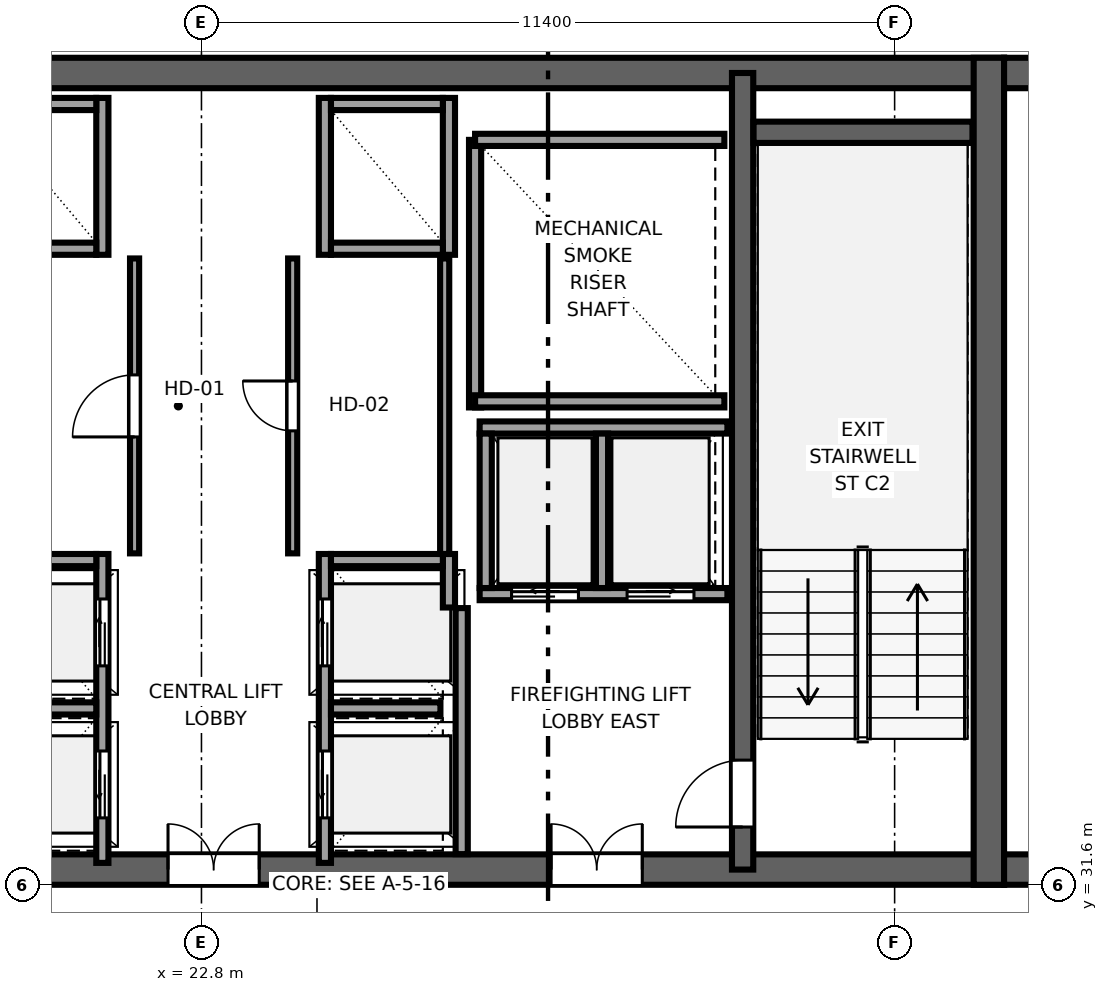
"""IFC4 building model, lengths in metres.
Left out: names, types, materials, properties, quantities, classifications, styles, units other than length and angle.
Written with IfcOpenShell. Run it as: python <this file> out.ifc"""

import sys

from ifc_helpers import new_model, si_unit, direction, frame, frame_2d, origin, place, context, subcontext, project, spatial, rectangle, extrude, source, transform, mapped, element, fill, save


model = new_model("IFC4")
c1 = context("Model", 3, precision=1e-05, world=origin(), true_north=direction((0.0, 1.0)))
c2 = subcontext(c1, "Body", "Model", "MODEL_VIEW")
j1 = project(units=[si_unit("LENGTHUNIT", "METRE"), si_unit("PLANEANGLEUNIT", "RADIAN")], contexts=[c1])
p1 = place(None, origin())
s1 = spatial("IfcSite", under=j1, at=p1, CompositionType="ELEMENT")
p2 = place(p1, origin())
s2 = spatial("IfcBuilding", under=s1, at=p2, CompositionType="ELEMENT")
p3 = place(p2, frame((0.0, 0.0, 238.1)))
s3 = spatial("IfcBuildingStorey", under=s2, at=p3, CompositionType="ELEMENT", Elevation=238.1)
p4 = place(p3, frame((10.0, 31.85, 0.0), z_axis=(0.0, 0.0, 1.0), x_axis=(1.0, 0.0, 0.0)))
e1 = element("IfcWall", 1, at=p4, inside=s3, PredefinedType="SHEAR", context=c2, shape_type="SweptSolid", body=[
    extrude(rectangle(XDim=26.0, YDim=0.5, at=frame_2d((13.0, 0.0))), origin(), (0.0, 0.0, 1.0), 3.55),
])
p5 = place(p4, frame((7.45, 0.0, 0.0), z_axis=(0.0, 0.0, 1.0), x_axis=(-1.0, 0.0, 0.0)))
e2 = element("IfcOpeningElement", 2, at=p5, cuts=e1, PredefinedType="OPENING", context=c2, shape_type="SweptSolid", body=[
    extrude(rectangle(XDim=1.5, YDim=2.04, at=frame_2d((0.75, 1.02))), frame((0.0, 0.26, 0.0), z_axis=(0.0, -1.0, 0.0), x_axis=(1.0, 0.0, 0.0)), (0.0, 0.0, 1.0), 0.52),
])
p6 = place(p4, frame((13.75, 0.0, 0.0), z_axis=(0.0, 0.0, 1.0), x_axis=(-1.0, 0.0, 0.0)))
e3 = element("IfcOpeningElement", 3, at=p6, cuts=e1, PredefinedType="OPENING", context=c2, shape_type="SweptSolid", body=[
    extrude(rectangle(XDim=1.5, YDim=2.04, at=frame_2d((0.75, 1.02))), frame((0.0, 0.26, 0.0), z_axis=(0.0, -1.0, 0.0), x_axis=(1.0, 0.0, 0.0)), (0.0, 0.0, 1.0), 0.52),
])
p7 = place(p4, frame((20.05, 0.0, 0.0), z_axis=(0.0, 0.0, 1.0), x_axis=(-1.0, 0.0, 0.0)))
e4 = element("IfcOpeningElement", 4, at=p7, cuts=e1, PredefinedType="OPENING", context=c2, shape_type="SweptSolid", body=[
    extrude(rectangle(XDim=1.5, YDim=2.04, at=frame_2d((0.75, 1.02))), frame((0.0, 0.26, 0.0), z_axis=(0.0, -1.0, 0.0), x_axis=(1.0, 0.0, 0.0)), (0.0, 0.0, 1.0), 0.52),
])
p8 = place(p3, frame((10.0, 44.95, 0.0), z_axis=(0.0, 0.0, 1.0), x_axis=(1.0, 0.0, 0.0)))
e5 = element("IfcWall", 5, at=p8, inside=s3, PredefinedType="SHEAR", context=c2, shape_type="SweptSolid", body=[
    extrude(rectangle(XDim=26.0, YDim=0.5, at=frame_2d((13.0, 0.0))), origin(), (0.0, 0.0, 1.0), 3.55),
])
p9 = place(p3, frame((35.75, 31.6, 0.0), z_axis=(0.0, 0.0, 1.0), x_axis=(0.0, 1.0, 0.0)))
e6 = element("IfcWall", 6, at=p9, inside=s3, PredefinedType="SHEAR", context=c2, shape_type="SweptSolid", body=[
    extrude(rectangle(XDim=13.6, YDim=0.5, at=frame_2d((6.8, 0.0))), origin(), (0.0, 0.0, 1.0), 3.55),
])
p10 = place(p3, frame((31.7, 31.85, 0.0), z_axis=(0.0, 0.0, 1.0), x_axis=(0.0, 1.0, 0.0)))
e7 = element("IfcWall", 7, at=p10, inside=s3, PredefinedType="SHEAR", context=c2, shape_type="SweptSolid", body=[
    extrude(rectangle(XDim=13.1, YDim=0.35, at=frame_2d((6.55, 0.0))), origin(), (0.0, 0.0, 1.0), 3.55),
])
p11 = place(p10, frame((1.8, 0.0, 0.0), z_axis=(0.0, 0.0, 1.0), x_axis=(-1.0, 0.0, 0.0)))
e8 = element("IfcOpeningElement", 8, at=p11, cuts=e7, PredefinedType="OPENING", context=c2, shape_type="SweptSolid", body=[
    extrude(rectangle(XDim=1.1, YDim=2.12, at=frame_2d((0.55, 1.06))), frame((0.0, 0.185, 0.0), z_axis=(0.0, -1.0, 0.0), x_axis=(1.0, 0.0, 0.0)), (0.0, 0.0, 1.0), 0.37),
])
p12 = place(p3, frame((36.0, 31.85, 0.0), z_axis=(0.0, 0.0, 1.0), x_axis=(1.0, 0.0, 0.0)))
e9 = element("IfcWall", 9, at=p12, inside=s3, PredefinedType="SHEAR", context=c2, shape_type="SweptSolid", body=[
    extrude(rectangle(XDim=3.8, YDim=0.5, at=frame_2d((1.9, 0.0))), origin(), (0.0, 0.0, 1.0), 3.55),
])
p13 = place(p12, frame((1.54, 0.0, 0.0), z_axis=(0.0, 0.0, 1.0), x_axis=(-1.0, 0.0, 0.0)))
e10 = element("IfcOpeningElement", 10, at=p13, cuts=e9, PredefinedType="OPENING", context=c2, shape_type="SweptSolid", body=[
    extrude(rectangle(XDim=1.02, YDim=2.03, at=frame_2d((0.51, 1.015))), frame((0.0, 0.26, 0.0), z_axis=(0.0, -1.0, 0.0), x_axis=(1.0, 0.0, 0.0)), (0.0, 0.0, 1.0), 0.52),
])
p14 = place(p3, frame((36.0, 44.95, 0.0), z_axis=(0.0, 0.0, 1.0), x_axis=(1.0, 0.0, 0.0)))
e11 = element("IfcWall", 11, at=p14, inside=s3, PredefinedType="SHEAR", context=c2, shape_type="SweptSolid", body=[
    extrude(rectangle(XDim=1.35, YDim=0.5, at=frame_2d((0.675, 0.0))), origin(), (0.0, 0.0, 1.0), 3.55),
])
p15 = place(p3, frame((31.88, 43.975, 0.0), z_axis=(0.0, 0.0, 1.0), x_axis=(1.0, 0.0, 0.0)))
e12 = element("IfcWall", 12, at=p15, inside=s3, PredefinedType="SHEAR", context=c2, shape_type="SweptSolid", body=[
    extrude(rectangle(XDim=3.6, YDim=0.35, at=frame_2d((1.8, 0.0))), origin(), (0.0, 0.0, 1.0), 3.55),
])
p16 = place(p3, frame((27.3, 39.45, 0.0), z_axis=(0.0, 0.0, 1.0), x_axis=(0.0, 1.0, 0.0)))
e13 = element("IfcWall", 13, at=p16, inside=s3, PredefinedType="SOLIDWALL", context=c2, shape_type="SweptSolid", body=[
    extrude(rectangle(XDim=4.4, YDim=0.2, at=frame_2d((2.2, 0.0))), origin(), (0.0, 0.0, 1.0), 3.29),
])
for number, where, z_axis, x_axis in (
    (14, (27.3, 39.55, 0.0), (0.0, 0.0, 1.0), (1.0, 0.0, 0.0)),
    (15, (27.3, 43.85, 0.0), (0.0, 0.0, 1.0), (1.0, 0.0, 0.0)),
):
    element("IfcWall", number, at=place(p3, frame(where, z_axis=z_axis, x_axis=x_axis)), inside=s3, PredefinedType="SOLIDWALL", context=c2, shape_type="SweptSolid", body=[
        extrude(rectangle(XDim=4.1, YDim=0.2, at=frame_2d((2.05, 0.0))), origin(), (0.0, 0.0, 1.0), 3.29),
    ])
p17 = place(p3, frame((27.08, 32.104, 0.0), z_axis=(0.0, 0.0, 1.0), x_axis=(0.0, 1.0, 0.0)))
e16 = element("IfcWall", 16, at=p17, inside=s3, PredefinedType="SOLIDWALL", context=c2, shape_type="SweptSolid", body=[
    extrude(rectangle(XDim=4.046, YDim=0.2, at=frame_2d((2.023, 0.0))), origin(), (0.0, 0.0, 1.0), 3.29),
])
p18 = place(p3, frame((21.17, 31.96, 0.0), z_axis=(0.0, 0.0, 1.0), x_axis=(0.0, 1.0, 0.0)))
e17 = element("IfcWall", 17, at=p18, inside=s3, PredefinedType="SOLIDWALL", context=c2, shape_type="SweptSolid", body=[
    extrude(rectangle(XDim=5.08, YDim=0.2, at=frame_2d((2.54, 0.0))), origin(), (0.0, 0.0, 1.0), 3.29),
])
p19 = place(p18, frame((0.74, 0.0, 0.0)))
e18 = element("IfcOpeningElement", 18, at=p19, cuts=e17, PredefinedType="OPENING", context=c2, shape_type="SweptSolid", body=[
    extrude(rectangle(XDim=1.1, YDim=2.12, at=frame_2d((0.55, 1.06))), frame((0.0, 0.11, 0.0), z_axis=(0.0, -1.0, 0.0), x_axis=(1.0, 0.0, 0.0)), (0.0, 0.0, 1.0), 0.22),
])
p20 = place(p18, frame((3.24, 0.0, 0.0)))
e19 = element("IfcOpeningElement", 19, at=p20, cuts=e17, PredefinedType="OPENING", context=c2, shape_type="SweptSolid", body=[
    extrude(rectangle(XDim=1.1, YDim=2.12, at=frame_2d((0.55, 1.06))), frame((0.0, 0.11, 0.0), z_axis=(0.0, -1.0, 0.0), x_axis=(1.0, 0.0, 0.0)), (0.0, 0.0, 1.0), 0.22),
])
p21 = place(p3, frame((19.23, 36.94, 0.0), z_axis=(0.0, 0.0, 1.0), x_axis=(1.0, 0.0, 0.0)))
e20 = element("IfcWall", 20, at=p21, inside=s3, PredefinedType="SOLIDWALL", context=c2, shape_type="SweptSolid", body=[
    extrude(rectangle(XDim=1.84, YDim=0.2, at=frame_2d((0.92, 0.0))), origin(), (0.0, 0.0, 1.0), 3.29),
])
p22 = place(p3, frame((19.27, 34.5, 0.0), z_axis=(0.0, 0.0, 1.0), x_axis=(1.0, 0.0, 0.0)))
e21 = element("IfcWall", 21, at=p22, inside=s3, PredefinedType="SOLIDWALL", context=c2, shape_type="SweptSolid", body=[
    extrude(rectangle(XDim=1.8, YDim=0.2, at=frame_2d((0.9, 0.0))), origin(), (0.0, 0.0, 1.0), 3.29),
])
p23 = place(p3, frame((21.17, 41.96, 0.0), z_axis=(0.0, 0.0, 1.0), x_axis=(0.0, 1.0, 0.0)))
e22 = element("IfcWall", 22, at=p23, inside=s3, PredefinedType="SOLIDWALL", context=c2, shape_type="SweptSolid", body=[
    extrude(rectangle(XDim=2.58, YDim=0.2, at=frame_2d((1.29, 0.0))), origin(), (0.0, 0.0, 1.0), 3.29),
])
for number, where, z_axis, x_axis in (
    (23, (19.23, 42.06, 0.0), (0.0, 0.0, 1.0), (1.0, 0.0, 0.0)),
    (24, (19.23, 44.44, 0.0), (0.0, 0.0, 1.0), (1.0, 0.0, 0.0)),
):
    element("IfcWall", number, at=place(p3, frame(where, z_axis=z_axis, x_axis=x_axis)), inside=s3, PredefinedType="SOLIDWALL", context=c2, shape_type="SweptSolid", body=[
        extrude(rectangle(XDim=1.84, YDim=0.2, at=frame_2d((0.92, 0.0))), origin(), (0.0, 0.0, 1.0), 3.29),
    ])
p24 = place(p3, frame((27.375, 36.38, 0.0), z_axis=(0.0, 0.0, 1.0), x_axis=(1.0, 0.0, 0.0)))
e25 = element("IfcWall", 25, at=p24, inside=s3, PredefinedType="SOLIDWALL", context=c2, shape_type="SweptSolid", body=[
    extrude(rectangle(XDim=4.075, YDim=0.2, at=frame_2d((2.038, 0.0))), origin(), (0.0, 0.0, 1.0), 3.29),
])
p25 = place(p24, frame((0.525, 0.0, 0.0)))
e26 = element("IfcOpeningElement", 26, at=p25, cuts=e25, PredefinedType="OPENING", context=c2, shape_type="SweptSolid", body=[
    extrude(rectangle(XDim=1.1, YDim=2.12, at=frame_2d((0.55, 1.06))), frame((0.0, 0.11, 0.0), z_axis=(0.0, -1.0, 0.0), x_axis=(1.0, 0.0, 0.0)), (0.0, 0.0, 1.0), 0.22),
])
p26 = place(p24, frame((2.425, 0.0, 0.0)))
e27 = element("IfcOpeningElement", 27, at=p26, cuts=e25, PredefinedType="OPENING", context=c2, shape_type="SweptSolid", body=[
    extrude(rectangle(XDim=1.1, YDim=2.12, at=frame_2d((0.55, 1.06))), frame((0.0, 0.11, 0.0), z_axis=(0.0, -1.0, 0.0), x_axis=(1.0, 0.0, 0.0)), (0.0, 0.0, 1.0), 0.22),
])
p27 = place(p3, frame((27.375, 39.12, 0.0), z_axis=(0.0, 0.0, 1.0), x_axis=(1.0, 0.0, 0.0)))
e28 = element("IfcWall", 28, at=p27, inside=s3, PredefinedType="SOLIDWALL", context=c2, shape_type="SweptSolid", body=[
    extrude(rectangle(XDim=4.075, YDim=0.2, at=frame_2d((2.038, 0.0))), origin(), (0.0, 0.0, 1.0), 3.29),
])
for number, where, z_axis, x_axis in (
    (29, (27.475, 36.48, 0.0), (0.0, 0.0, 1.0), (0.0, 1.0, 0.0)),
    (30, (29.387, 36.48, 0.0), (0.0, 0.0, 1.0), (0.0, 1.0, 0.0)),
):
    element("IfcWall", number, at=place(p3, frame(where, z_axis=z_axis, x_axis=x_axis)), inside=s3, PredefinedType="SOLIDWALL", context=c2, shape_type="SweptSolid", body=[
        extrude(rectangle(XDim=2.54, YDim=0.2, at=frame_2d((1.27, 0.0))), origin(), (0.0, 0.0, 1.0), 3.29),
    ])
p28 = place(p3, frame((24.83, 31.96, 0.0), z_axis=(0.0, 0.0, 1.0), x_axis=(0.0, 1.0, 0.0)))
e31 = element("IfcWall", 31, at=p28, inside=s3, PredefinedType="SOLIDWALL", context=c2, shape_type="SweptSolid", body=[
    extrude(rectangle(XDim=5.08, YDim=0.2, at=frame_2d((2.54, 0.0))), origin(), (0.0, 0.0, 1.0), 3.29),
])
p29 = place(p28, frame((0.74, 0.0, 0.0)))
e32 = element("IfcOpeningElement", 32, at=p29, cuts=e31, PredefinedType="OPENING", context=c2, shape_type="SweptSolid", body=[
    extrude(rectangle(XDim=1.1, YDim=2.12, at=frame_2d((0.55, 1.06))), frame((0.0, 0.11, 0.0), z_axis=(0.0, -1.0, 0.0), x_axis=(1.0, 0.0, 0.0)), (0.0, 0.0, 1.0), 0.22),
])
p30 = place(p28, frame((3.24, 0.0, 0.0)))
e33 = element("IfcOpeningElement", 33, at=p30, cuts=e31, PredefinedType="OPENING", context=c2, shape_type="SweptSolid", body=[
    extrude(rectangle(XDim=1.1, YDim=2.12, at=frame_2d((0.55, 1.06))), frame((0.0, 0.11, 0.0), z_axis=(0.0, -1.0, 0.0), x_axis=(1.0, 0.0, 0.0)), (0.0, 0.0, 1.0), 0.22),
])
p31 = place(p3, frame((26.87, 36.16, 0.0), z_axis=(0.0, 0.0, 1.0), x_axis=(0.0, 1.0, 0.0)))
e34 = element("IfcWall", 34, at=p31, inside=s3, PredefinedType="SOLIDWALL", context=c2, shape_type="SweptSolid", body=[
    extrude(rectangle(XDim=0.88, YDim=0.2, at=frame_2d((0.44, 0.0))), origin(), (0.0, 0.0, 1.0), 3.29),
])
p32 = place(p3, frame((24.93, 36.94, 0.0), z_axis=(0.0, 0.0, 1.0), x_axis=(1.0, 0.0, 0.0)))
e35 = element("IfcWall", 35, at=p32, inside=s3, PredefinedType="SOLIDWALL", context=c2, shape_type="SweptSolid", body=[
    extrude(rectangle(XDim=1.84, YDim=0.2, at=frame_2d((0.92, 0.0))), origin(), (0.0, 0.0, 1.0), 3.29),
])
p33 = place(p3, frame((24.93, 34.5, 0.0), z_axis=(0.0, 0.0, 1.0), x_axis=(1.0, 0.0, 0.0)))
e36 = element("IfcWall", 36, at=p33, inside=s3, PredefinedType="SOLIDWALL", context=c2, shape_type="SweptSolid", body=[
    extrude(rectangle(XDim=1.8, YDim=0.2, at=frame_2d((0.9, 0.0))), origin(), (0.0, 0.0, 1.0), 3.29),
])
for number, where, z_axis, x_axis in (
    (37, (24.83, 41.96, 0.0), (0.0, 0.0, 1.0), (0.0, 1.0, 0.0)),
    (38, (26.87, 41.96, 0.0), (0.0, 0.0, 1.0), (0.0, 1.0, 0.0)),
):
    element("IfcWall", number, at=place(p3, frame(where, z_axis=z_axis, x_axis=x_axis)), inside=s3, PredefinedType="SOLIDWALL", context=c2, shape_type="SweptSolid", body=[
        extrude(rectangle(XDim=2.58, YDim=0.2, at=frame_2d((1.29, 0.0))), origin(), (0.0, 0.0, 1.0), 3.29),
    ])
for number, where, z_axis, x_axis in (
    (39, (24.93, 42.06, 0.0), (0.0, 0.0, 1.0), (1.0, 0.0, 0.0)),
    (40, (24.93, 44.44, 0.0), (0.0, 0.0, 1.0), (1.0, 0.0, 0.0)),
):
    element("IfcWall", number, at=place(p3, frame(where, z_axis=z_axis, x_axis=x_axis)), inside=s3, PredefinedType="SOLIDWALL", context=c2, shape_type="SweptSolid", body=[
        extrude(rectangle(XDim=1.84, YDim=0.2, at=frame_2d((0.92, 0.0))), origin(), (0.0, 0.0, 1.0), 3.29),
    ])
p34 = place(p3, frame((21.7, 37.05, 0.0), z_axis=(0.0, 0.0, 1.0), x_axis=(0.0, 1.0, 0.0)))
e41 = element("IfcWall", 41, at=p34, inside=s3, PredefinedType="PARTITIONING", context=c2, shape_type="SweptSolid", body=[
    extrude(rectangle(XDim=4.85, YDim=0.15, at=frame_2d((2.425, 0.0))), origin(), (0.0, 0.0, 1.0), 3.29),
])
p35 = place(p34, frame((1.915, 0.0, 0.0)))
e42 = element("IfcOpeningElement", 42, at=p35, cuts=e41, PredefinedType="OPENING", context=c2, shape_type="SweptSolid", body=[
    extrude(rectangle(XDim=1.02, YDim=2.03, at=frame_2d((0.51, 1.015))), frame((0.0, 0.085, 0.0), z_axis=(0.0, -1.0, 0.0), x_axis=(1.0, 0.0, 0.0)), (0.0, 0.0, 1.0), 0.17),
])
p36 = place(p3, frame((24.3, 37.05, 0.0), z_axis=(0.0, 0.0, 1.0), x_axis=(0.0, 1.0, 0.0)))
e43 = element("IfcWall", 43, at=p36, inside=s3, PredefinedType="PARTITIONING", context=c2, shape_type="SweptSolid", body=[
    extrude(rectangle(XDim=4.85, YDim=0.15, at=frame_2d((2.425, 0.0))), origin(), (0.0, 0.0, 1.0), 3.29),
])
p37 = place(p36, frame((2.015, 0.0, 0.0)))
e44 = element("IfcOpeningElement", 44, at=p37, cuts=e43, PredefinedType="OPENING", context=c2, shape_type="SweptSolid", body=[
    extrude(rectangle(XDim=0.82, YDim=2.01, at=frame_2d((0.41, 1.005))), frame((0.0, 0.085, 0.0), z_axis=(0.0, -1.0, 0.0), x_axis=(1.0, 0.0, 0.0)), (0.0, 0.0, 1.0), 0.17),
])
p38 = place(p3, frame((26.8, 37.04, 0.0), z_axis=(0.0, 0.0, 1.0), x_axis=(0.0, 1.0, 0.0)))
e45 = element("IfcWall", 45, at=p38, inside=s3, PredefinedType="PARTITIONING", context=c2, shape_type="SweptSolid", body=[
    extrude(rectangle(XDim=4.86, YDim=0.15, at=frame_2d((2.43, 0.0))), origin(), (0.0, 0.0, 1.0), 3.29),
])
m1 = source(origin(), c2, "Body", "SweptSolid", [
    extrude(rectangle(XDim=1.1, YDim=2.12, at=frame_2d((0.55, 1.06))), frame((0.0, 0.025, 0.0), z_axis=(0.0, -1.0, 0.0), x_axis=(1.0, 0.0, 0.0)), (0.0, 0.0, 1.0), 0.05),
])
p39 = place(p11, origin())
e46 = element("IfcDoor", 46, at=p39, inside=s3, OperationType="SINGLE_SWING_LEFT", PredefinedType="DOOR", context=c2, shape_type="MappedRepresentation", body=[
    mapped(m1, transform((0.0, 0.0, 0.0), x_axis=(1.0, 0.0, 0.0), y_axis=(0.0, 1.0, 0.0), z_axis=(0.0, 0.0, 1.0), scale=1.0)),
])
fill(e8, e46)
m2 = source(origin(), c2, "Body", "SweptSolid", [
    extrude(rectangle(XDim=1.5, YDim=2.04, at=frame_2d((0.75, 1.02))), frame((0.0, 0.025, 0.0), z_axis=(0.0, -1.0, 0.0), x_axis=(1.0, 0.0, 0.0)), (0.0, 0.0, 1.0), 0.05),
])
p40 = place(p6, origin())
e47 = element("IfcDoor", 47, at=p40, inside=s3, OperationType="DOUBLE_DOOR_SINGLE_SWING", PredefinedType="DOOR", context=c2, shape_type="MappedRepresentation", body=[
    mapped(m2, transform((0.0, 0.0, 0.0), x_axis=(1.0, 0.0, 0.0), y_axis=(0.0, 1.0, 0.0), z_axis=(0.0, 0.0, 1.0), scale=1.0)),
])
fill(e3, e47)
p41 = place(p7, origin())
e48 = element("IfcDoor", 48, at=p41, inside=s3, OperationType="DOUBLE_DOOR_SINGLE_SWING", PredefinedType="DOOR", context=c2, shape_type="MappedRepresentation", body=[
    mapped(m2, transform((0.0, 0.0, 0.0), x_axis=(1.0, 0.0, 0.0), y_axis=(0.0, 1.0, 0.0), z_axis=(0.0, 0.0, 1.0), scale=1.0)),
])
fill(e4, e48)
m3 = source(origin(), c2, "Body", "SweptSolid", [
    extrude(rectangle(XDim=1.1, YDim=2.12, at=frame_2d((0.55, 1.06))), frame((0.0, 0.025, 0.0), z_axis=(0.0, -1.0, 0.0), x_axis=(1.0, 0.0, 0.0)), (0.0, 0.0, 1.0), 0.05),
])
p42 = place(p19, origin())
e49 = element("IfcDoor", 49, at=p42, inside=s3, OperationType="SLIDING_TO_LEFT", PredefinedType="DOOR", context=c2, shape_type="MappedRepresentation", body=[
    mapped(m3, transform((0.0, 0.0, 0.0), x_axis=(1.0, 0.0, 0.0), y_axis=(0.0, 1.0, 0.0), z_axis=(0.0, 0.0, 1.0), scale=1.0)),
])
fill(e18, e49)
p43 = place(p20, origin())
e50 = element("IfcDoor", 50, at=p43, inside=s3, OperationType="SLIDING_TO_RIGHT", PredefinedType="DOOR", context=c2, shape_type="MappedRepresentation", body=[
    mapped(m3, transform((0.0, 0.0, 0.0), x_axis=(1.0, 0.0, 0.0), y_axis=(0.0, 1.0, 0.0), z_axis=(0.0, 0.0, 1.0), scale=1.0)),
])
fill(e19, e50)
p44 = place(p25, origin())
e51 = element("IfcDoor", 51, at=p44, inside=s3, OperationType="SLIDING_TO_LEFT", PredefinedType="DOOR", context=c2, shape_type="MappedRepresentation", body=[
    mapped(m3, transform((0.0, 0.0, 0.0), x_axis=(1.0, 0.0, 0.0), y_axis=(0.0, 1.0, 0.0), z_axis=(0.0, 0.0, 1.0), scale=1.0)),
])
fill(e26, e51)
p45 = place(p26, origin())
e52 = element("IfcDoor", 52, at=p45, inside=s3, OperationType="SLIDING_TO_RIGHT", PredefinedType="DOOR", context=c2, shape_type="MappedRepresentation", body=[
    mapped(m3, transform((0.0, 0.0, 0.0), x_axis=(1.0, 0.0, 0.0), y_axis=(0.0, 1.0, 0.0), z_axis=(0.0, 0.0, 1.0), scale=1.0)),
])
fill(e27, e52)
p46 = place(p29, origin())
e53 = element("IfcDoor", 53, at=p46, inside=s3, OperationType="SLIDING_TO_LEFT", PredefinedType="DOOR", context=c2, shape_type="MappedRepresentation", body=[
    mapped(m3, transform((0.0, 0.0, 0.0), x_axis=(1.0, 0.0, 0.0), y_axis=(0.0, 1.0, 0.0), z_axis=(0.0, 0.0, 1.0), scale=1.0)),
])
fill(e32, e53)
p47 = place(p30, origin())
e54 = element("IfcDoor", 54, at=p47, inside=s3, OperationType="SLIDING_TO_RIGHT", PredefinedType="DOOR", context=c2, shape_type="MappedRepresentation", body=[
    mapped(m3, transform((0.0, 0.0, 0.0), x_axis=(1.0, 0.0, 0.0), y_axis=(0.0, 1.0, 0.0), z_axis=(0.0, 0.0, 1.0), scale=1.0)),
])
fill(e33, e54)
m4 = source(origin(), c2, "Body", "SweptSolid", [
    extrude(rectangle(XDim=1.02, YDim=2.03, at=frame_2d((0.51, 1.015))), frame((0.0, 0.025, 0.0), z_axis=(0.0, -1.0, 0.0), x_axis=(1.0, 0.0, 0.0)), (0.0, 0.0, 1.0), 0.05),
])
p48 = place(p35, origin())
e55 = element("IfcDoor", 55, at=p48, inside=s3, OperationType="SINGLE_SWING_LEFT", PredefinedType="DOOR", context=c2, shape_type="MappedRepresentation", body=[
    mapped(m4, transform((0.0, 0.0, 0.0), x_axis=(1.0, 0.0, 0.0), y_axis=(0.0, 1.0, 0.0), z_axis=(0.0, 0.0, 1.0), scale=1.0)),
])
fill(e42, e55)
m5 = source(origin(), c2, "Body", "SweptSolid", [
    extrude(rectangle(XDim=0.82, YDim=2.01, at=frame_2d((0.41, 1.005))), frame((0.0, 0.025, 0.0), z_axis=(0.0, -1.0, 0.0), x_axis=(1.0, 0.0, 0.0)), (0.0, 0.0, 1.0), 0.05),
])
p49 = place(p37, origin())
e56 = element("IfcDoor", 56, at=p49, inside=s3, OperationType="SINGLE_SWING_RIGHT", PredefinedType="DOOR", context=c2, shape_type="MappedRepresentation", body=[
    mapped(m5, transform((0.0, 0.0, 0.0), x_axis=(1.0, 0.0, 0.0), y_axis=(0.0, 1.0, 0.0), z_axis=(0.0, 0.0, 1.0), scale=1.0)),
])
fill(e44, e56)
save(model, sys.argv[1])
